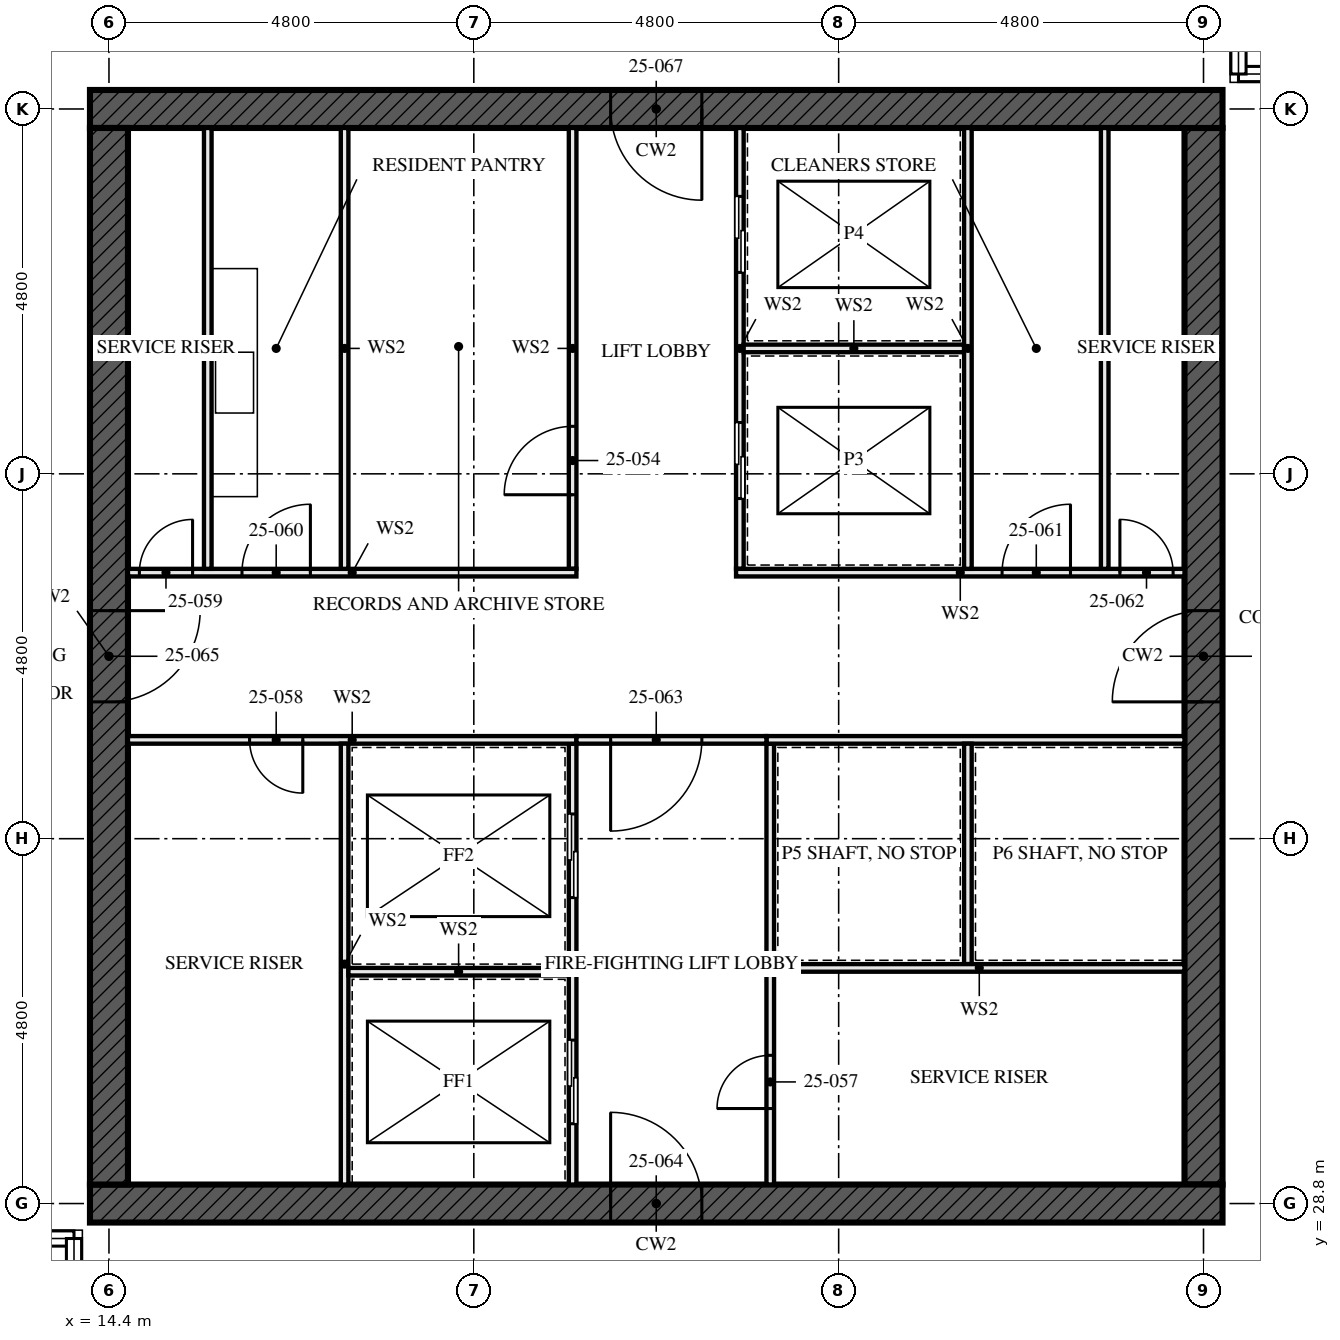
"""IFC4 building model, lengths in metres.
Left out: names, types, materials, properties, quantities, classifications, styles, units other than length and angle.
Written with IfcOpenShell. Run it as: python <this file> out.ifc"""

import sys

from ifc_helpers import new_model, si_unit, direction, frame, frame_2d, origin, place, context, subcontext, project, spatial, rectangle, extrude, element, fill, save


model = new_model("IFC4")
c1 = context("Model", 3, precision=1e-05, world=origin(), true_north=direction((0.0, 1.0)))
c2 = subcontext(c1, "Body", "Model", "MODEL_VIEW")
j1 = project(units=[si_unit("LENGTHUNIT", "METRE"), si_unit("PLANEANGLEUNIT", "RADIAN")], contexts=[c1])
p1 = place(None, origin())
s1 = spatial("IfcSite", under=j1, at=p1, CompositionType="ELEMENT")
p2 = place(p1, origin())
s2 = spatial("IfcBuilding", under=s1, at=p2, CompositionType="ELEMENT")
p3 = place(p2, frame((0.0, 0.0, 94.5)))
s3 = spatial("IfcBuildingStorey", under=s2, at=p3, CompositionType="ELEMENT", Elevation=94.5)
p4 = place(p3, frame((14.15, 28.8, -0.17), z_axis=(0.0, 0.0, 1.0), x_axis=(1.0, 0.0, 0.0)))
e1 = element("IfcWall", 1, at=p4, inside=s3, PredefinedType="SHEAR", context=c2, shape_type="SweptSolid", body=[
    extrude(rectangle(XDim=14.9, YDim=0.5, at=frame_2d((7.45, 0.0))), origin(), (0.0, 0.0, 1.0), 3.5),
])
p5 = place(p4, frame((6.85, 0.0, 0.17)))
e2 = element("IfcOpeningElement", 2, at=p5, cuts=e1, PredefinedType="OPENING", context=c2, shape_type="SweptSolid", body=[
    extrude(rectangle(XDim=1.2, YDim=2.1, at=frame_2d((0.6, 1.05))), frame((0.0, 0.26, 0.0), z_axis=(0.0, -1.0, 0.0), x_axis=(1.0, 0.0, 0.0)), (0.0, 0.0, 1.0), 0.521),
])
p6 = place(p3, frame((29.05, 43.2, -0.17), z_axis=(0.0, 0.0, 1.0), x_axis=(-1.0, 0.0, 0.0)))
e3 = element("IfcWall", 3, at=p6, inside=s3, PredefinedType="SHEAR", context=c2, shape_type="SweptSolid", body=[
    extrude(rectangle(XDim=14.9, YDim=0.5, at=frame_2d((7.45, 0.0))), origin(), (0.0, 0.0, 1.0), 3.5),
])
p7 = place(p6, frame((6.85, 0.0, 0.17)))
e4 = element("IfcOpeningElement", 4, at=p7, cuts=e3, PredefinedType="OPENING", context=c2, shape_type="SweptSolid", body=[
    extrude(rectangle(XDim=1.2, YDim=2.1, at=frame_2d((0.6, 1.05))), frame((0.0, 0.26, 0.0), z_axis=(0.0, -1.0, 0.0), x_axis=(1.0, 0.0, 0.0)), (0.0, 0.0, 1.0), 0.521),
])
p8 = place(p3, frame((14.4, 42.95, -0.17), z_axis=(0.0, 0.0, 1.0), x_axis=(0.0, -1.0, 0.0)))
e5 = element("IfcWall", 5, at=p8, inside=s3, PredefinedType="SHEAR", context=c2, shape_type="SweptSolid", body=[
    extrude(rectangle(XDim=13.9, YDim=0.5, at=frame_2d((6.95, 0.0))), origin(), (0.0, 0.0, 1.0), 3.5),
])
p9 = place(p8, frame((6.35, 0.0, 0.17)))
e6 = element("IfcOpeningElement", 6, at=p9, cuts=e5, PredefinedType="OPENING", context=c2, shape_type="SweptSolid", body=[
    extrude(rectangle(XDim=1.2, YDim=2.1, at=frame_2d((0.6, 1.05))), frame((0.0, 0.26, 0.0), z_axis=(0.0, -1.0, 0.0), x_axis=(1.0, 0.0, 0.0)), (0.0, 0.0, 1.0), 0.521),
])
p10 = place(p3, frame((28.8, 29.05, -0.17), z_axis=(0.0, 0.0, 1.0), x_axis=(0.0, 1.0, 0.0)))
e7 = element("IfcWall", 7, at=p10, inside=s3, PredefinedType="SHEAR", context=c2, shape_type="SweptSolid", body=[
    extrude(rectangle(XDim=13.9, YDim=0.5, at=frame_2d((6.95, 0.0))), origin(), (0.0, 0.0, 1.0), 3.5),
])
p11 = place(p10, frame((6.35, 0.0, 0.17)))
e8 = element("IfcOpeningElement", 8, at=p11, cuts=e7, PredefinedType="OPENING", context=c2, shape_type="SweptSolid", body=[
    extrude(rectangle(XDim=1.2, YDim=2.1, at=frame_2d((0.6, 1.05))), frame((0.0, 0.26, 0.0), z_axis=(0.0, -1.0, 0.0), x_axis=(1.0, 0.0, 0.0)), (0.0, 0.0, 1.0), 0.521),
])
for number, where, z_axis, x_axis in (
    (9, (15.7, 37.15, 0.0), (0.0, 0.0, 1.0), (0.0, 1.0, 0.0)),
    (10, (27.5, 37.15, 0.0), (0.0, 0.0, 1.0), (0.0, 1.0, 0.0)),
):
    element("IfcWall", number, at=place(p3, frame(where, z_axis=z_axis, x_axis=x_axis)), inside=s3, PredefinedType="SOLIDWALL", context=c2, shape_type="SweptSolid", body=[
        extrude(rectangle(XDim=5.8, YDim=0.1, at=frame_2d((2.9, 0.0))), origin(), (0.0, 0.0, 1.0), 3.33),
    ])
p12 = place(p3, frame((20.5, 29.05, 0.0), z_axis=(0.0, 0.0, 1.0), x_axis=(0.0, 1.0, 0.0)))
e11 = element("IfcWall", 11, at=p12, inside=s3, PredefinedType="SOLIDWALL", context=c2, shape_type="SweptSolid", body=[
    extrude(rectangle(XDim=5.8, YDim=0.1, at=frame_2d((2.9, 0.0))), origin(), (0.0, 0.0, 1.0), 3.33),
])
p13 = place(p12, frame((0.8, 0.0, 0.0)))
e12 = element("IfcOpeningElement", 12, at=p13, cuts=e11, PredefinedType="OPENING", context=c2, shape_type="SweptSolid", body=[
    extrude(rectangle(XDim=1.1, YDim=2.3, at=frame_2d((0.55, 1.15))), frame((0.0, 0.061, 0.0), z_axis=(0.0, -1.0, 0.0), x_axis=(1.0, 0.0, 0.0)), (0.0, 0.0, 1.0), 0.121),
])
p14 = place(p12, frame((3.775, 0.0, 0.0)))
e13 = element("IfcOpeningElement", 13, at=p14, cuts=e11, PredefinedType="OPENING", context=c2, shape_type="SweptSolid", body=[
    extrude(rectangle(XDim=1.1, YDim=2.3, at=frame_2d((0.55, 1.15))), frame((0.0, 0.061, 0.0), z_axis=(0.0, -1.0, 0.0), x_axis=(1.0, 0.0, 0.0)), (0.0, 0.0, 1.0), 0.121),
])
p15 = place(p3, frame((20.5, 37.15, 0.0), z_axis=(0.0, 0.0, 1.0), x_axis=(0.0, 1.0, 0.0)))
e14 = element("IfcWall", 14, at=p15, inside=s3, PredefinedType="SOLIDWALL", context=c2, shape_type="SweptSolid", body=[
    extrude(rectangle(XDim=5.8, YDim=0.1, at=frame_2d((2.9, 0.0))), origin(), (0.0, 0.0, 1.0), 3.33),
])
p16 = place(p15, frame((0.975, 0.0, 0.0)))
e15 = element("IfcOpeningElement", 15, at=p16, cuts=e14, PredefinedType="OPENING", context=c2, shape_type="SweptSolid", body=[
    extrude(rectangle(XDim=0.9, YDim=2.1, at=frame_2d((0.45, 1.05))), frame((0.0, 0.061, 0.0), z_axis=(0.0, -1.0, 0.0), x_axis=(1.0, 0.0, 0.0)), (0.0, 0.0, 1.0), 0.121),
])
p17 = place(p3, frame((22.7, 37.15, 0.0), z_axis=(0.0, 0.0, 1.0), x_axis=(0.0, 1.0, 0.0)))
e16 = element("IfcWall", 16, at=p17, inside=s3, PredefinedType="SOLIDWALL", context=c2, shape_type="SweptSolid", body=[
    extrude(rectangle(XDim=5.8, YDim=0.1, at=frame_2d((2.9, 0.0))), origin(), (0.0, 0.0, 1.0), 3.33),
])
p18 = place(p17, frame((0.925, 0.0, 0.0)))
e17 = element("IfcOpeningElement", 17, at=p18, cuts=e16, PredefinedType="OPENING", context=c2, shape_type="SweptSolid", body=[
    extrude(rectangle(XDim=1.0, YDim=2.1, at=frame_2d((0.5, 1.05))), frame((0.0, 0.061, 0.0), z_axis=(0.0, -1.0, 0.0), x_axis=(1.0, 0.0, 0.0)), (0.0, 0.0, 1.0), 0.121),
])
p19 = place(p17, frame((3.9, 0.0, 0.0)))
e18 = element("IfcOpeningElement", 18, at=p19, cuts=e16, PredefinedType="OPENING", context=c2, shape_type="SweptSolid", body=[
    extrude(rectangle(XDim=1.0, YDim=2.1, at=frame_2d((0.5, 1.05))), frame((0.0, 0.061, 0.0), z_axis=(0.0, -1.0, 0.0), x_axis=(1.0, 0.0, 0.0)), (0.0, 0.0, 1.0), 0.121),
])
p20 = place(p3, frame((23.1, 29.05, 0.0), z_axis=(0.0, 0.0, 1.0), x_axis=(0.0, 1.0, 0.0)))
e19 = element("IfcWall", 19, at=p20, inside=s3, PredefinedType="SOLIDWALL", context=c2, shape_type="SweptSolid", body=[
    extrude(rectangle(XDim=5.8, YDim=0.1, at=frame_2d((2.9, 0.0))), origin(), (0.0, 0.0, 1.0), 3.33),
])
p21 = place(p20, frame((1.0, 0.0, 0.0)))
e20 = element("IfcOpeningElement", 20, at=p21, cuts=e19, PredefinedType="OPENING", context=c2, shape_type="SweptSolid", body=[
    extrude(rectangle(XDim=0.7, YDim=2.1, at=frame_2d((0.35, 1.05))), frame((0.0, 0.061, 0.0), z_axis=(0.0, -1.0, 0.0), x_axis=(1.0, 0.0, 0.0)), (0.0, 0.0, 1.0), 0.121),
])
p22 = place(p3, frame((14.65, 34.9, 0.0), z_axis=(0.0, 0.0, 1.0), x_axis=(1.0, 0.0, 0.0)))
e21 = element("IfcWall", 21, at=p22, inside=s3, PredefinedType="SOLIDWALL", context=c2, shape_type="SweptSolid", body=[
    extrude(rectangle(XDim=5.9, YDim=0.1, at=frame_2d((2.95, 0.0))), origin(), (0.0, 0.0, 1.0), 3.33),
])
p23 = place(p22, frame((1.6, 0.0, 0.0)))
e22 = element("IfcOpeningElement", 22, at=p23, cuts=e21, PredefinedType="OPENING", context=c2, shape_type="SweptSolid", body=[
    extrude(rectangle(XDim=0.7, YDim=2.1, at=frame_2d((0.35, 1.05))), frame((0.0, 0.061, 0.0), z_axis=(0.0, -1.0, 0.0), x_axis=(1.0, 0.0, 0.0)), (0.0, 0.0, 1.0), 0.121),
])
p24 = place(p3, frame((23.05, 34.9, 0.0), z_axis=(0.0, 0.0, 1.0), x_axis=(1.0, 0.0, 0.0)))
e23 = element("IfcWall", 23, at=p24, inside=s3, PredefinedType="SOLIDWALL", context=c2, shape_type="SweptSolid", body=[
    extrude(rectangle(XDim=5.5, YDim=0.1, at=frame_2d((2.75, 0.0))), origin(), (0.0, 0.0, 1.0), 3.33),
])
p25 = place(p3, frame((14.65, 37.1, 0.0), z_axis=(0.0, 0.0, 1.0), x_axis=(1.0, 0.0, 0.0)))
e24 = element("IfcWall", 24, at=p25, inside=s3, PredefinedType="SOLIDWALL", context=c2, shape_type="SweptSolid", body=[
    extrude(rectangle(XDim=5.9, YDim=0.1, at=frame_2d((2.95, 0.0))), origin(), (0.0, 0.0, 1.0), 3.33),
])
p26 = place(p25, frame((0.15, 0.0, 0.0)))
e25 = element("IfcOpeningElement", 25, at=p26, cuts=e24, PredefinedType="OPENING", context=c2, shape_type="SweptSolid", body=[
    extrude(rectangle(XDim=0.7, YDim=2.1, at=frame_2d((0.35, 1.05))), frame((0.0, 0.061, 0.0), z_axis=(0.0, -1.0, 0.0), x_axis=(1.0, 0.0, 0.0)), (0.0, 0.0, 1.0), 0.121),
])
p27 = place(p25, frame((1.5, 0.0, 0.0)))
e26 = element("IfcOpeningElement", 26, at=p27, cuts=e24, PredefinedType="OPENING", context=c2, shape_type="SweptSolid", body=[
    extrude(rectangle(XDim=0.9, YDim=2.1, at=frame_2d((0.45, 1.05))), frame((0.0, 0.061, 0.0), z_axis=(0.0, -1.0, 0.0), x_axis=(1.0, 0.0, 0.0)), (0.0, 0.0, 1.0), 0.121),
])
p28 = place(p3, frame((22.65, 37.1, 0.0), z_axis=(0.0, 0.0, 1.0), x_axis=(1.0, 0.0, 0.0)))
e27 = element("IfcWall", 27, at=p28, inside=s3, PredefinedType="SOLIDWALL", context=c2, shape_type="SweptSolid", body=[
    extrude(rectangle(XDim=5.9, YDim=0.1, at=frame_2d((2.95, 0.0))), origin(), (0.0, 0.0, 1.0), 3.33),
])
p29 = place(p28, frame((3.5, 0.0, 0.0)))
e28 = element("IfcOpeningElement", 28, at=p29, cuts=e27, PredefinedType="OPENING", context=c2, shape_type="SweptSolid", body=[
    extrude(rectangle(XDim=0.9, YDim=2.1, at=frame_2d((0.45, 1.05))), frame((0.0, 0.061, 0.0), z_axis=(0.0, -1.0, 0.0), x_axis=(1.0, 0.0, 0.0)), (0.0, 0.0, 1.0), 0.121),
])
p30 = place(p28, frame((5.05, 0.0, 0.0)))
e29 = element("IfcOpeningElement", 29, at=p30, cuts=e27, PredefinedType="OPENING", context=c2, shape_type="SweptSolid", body=[
    extrude(rectangle(XDim=0.7, YDim=2.1, at=frame_2d((0.35, 1.05))), frame((0.0, 0.061, 0.0), z_axis=(0.0, -1.0, 0.0), x_axis=(1.0, 0.0, 0.0)), (0.0, 0.0, 1.0), 0.121),
])
p31 = place(p3, frame((20.55, 34.9, 0.0), z_axis=(0.0, 0.0, 1.0), x_axis=(1.0, 0.0, 0.0)))
e30 = element("IfcWall", 30, at=p31, inside=s3, PredefinedType="SOLIDWALL", context=c2, shape_type="SweptSolid", body=[
    extrude(rectangle(XDim=2.5, YDim=0.1, at=frame_2d((1.25, 0.0))), origin(), (0.0, 0.0, 1.0), 3.33),
])
p32 = place(p31, frame((0.45, 0.0, 0.0)))
e31 = element("IfcOpeningElement", 31, at=p32, cuts=e30, PredefinedType="OPENING", context=c2, shape_type="SweptSolid", body=[
    extrude(rectangle(XDim=1.2, YDim=2.1, at=frame_2d((0.6, 1.05))), frame((0.0, 0.061, 0.0), z_axis=(0.0, -1.0, 0.0), x_axis=(1.0, 0.0, 0.0)), (0.0, 0.0, 1.0), 0.121),
])
p33 = place(p3, frame((17.5, 29.05, 0.0), z_axis=(0.0, 0.0, 1.0), x_axis=(0.0, 1.0, 0.0)))
e32 = element("IfcWall", 32, at=p33, inside=s3, PredefinedType="SOLIDWALL", context=c2, shape_type="SweptSolid", body=[
    extrude(rectangle(XDim=5.8, YDim=0.1, at=frame_2d((2.9, 0.0))), origin(), (0.0, 0.0, 1.0), 3.33),
])
p34 = place(p3, frame((17.55, 31.85, 0.0), z_axis=(0.0, 0.0, 1.0), x_axis=(1.0, 0.0, 0.0)))
e33 = element("IfcWall", 33, at=p34, inside=s3, PredefinedType="SOLIDWALL", context=c2, shape_type="SweptSolid", body=[
    extrude(rectangle(XDim=2.9, YDim=0.1, at=frame_2d((1.45, 0.0))), origin(), (0.0, 0.0, 1.0), 3.33),
])
p35 = place(p3, frame((17.5, 37.15, 0.0), z_axis=(0.0, 0.0, 1.0), x_axis=(0.0, 1.0, 0.0)))
e34 = element("IfcWall", 34, at=p35, inside=s3, PredefinedType="SOLIDWALL", context=c2, shape_type="SweptSolid", body=[
    extrude(rectangle(XDim=5.8, YDim=0.1, at=frame_2d((2.9, 0.0))), origin(), (0.0, 0.0, 1.0), 3.33),
])
p36 = place(p3, frame((22.75, 40.05, 0.0), z_axis=(0.0, 0.0, 1.0), x_axis=(1.0, 0.0, 0.0)))
e35 = element("IfcWall", 35, at=p36, inside=s3, PredefinedType="SOLIDWALL", context=c2, shape_type="SweptSolid", body=[
    extrude(rectangle(XDim=2.9, YDim=0.1, at=frame_2d((1.45, 0.0))), origin(), (0.0, 0.0, 1.0), 3.33),
])
p37 = place(p3, frame((25.7, 37.15, 0.0), z_axis=(0.0, 0.0, 1.0), x_axis=(0.0, 1.0, 0.0)))
e36 = element("IfcWall", 36, at=p37, inside=s3, PredefinedType="SOLIDWALL", context=c2, shape_type="SweptSolid", body=[
    extrude(rectangle(XDim=5.8, YDim=0.1, at=frame_2d((2.9, 0.0))), origin(), (0.0, 0.0, 1.0), 3.33),
])
p38 = place(p3, frame((25.7, 31.95, 0.0), z_axis=(0.0, 0.0, 1.0), x_axis=(0.0, 1.0, 0.0)))
e37 = element("IfcWall", 37, at=p38, inside=s3, PredefinedType="SOLIDWALL", context=c2, shape_type="SweptSolid", body=[
    extrude(rectangle(XDim=2.9, YDim=0.1, at=frame_2d((1.45, 0.0))), origin(), (0.0, 0.0, 1.0), 3.33),
])
p39 = place(p3, frame((23.15, 31.9, 0.0), z_axis=(0.0, 0.0, 1.0), x_axis=(1.0, 0.0, 0.0)))
e38 = element("IfcWall", 38, at=p39, inside=s3, PredefinedType="SOLIDWALL", context=c2, shape_type="SweptSolid", body=[
    extrude(rectangle(XDim=5.4, YDim=0.1, at=frame_2d((2.7, 0.0))), origin(), (0.0, 0.0, 1.0), 3.33),
])
p40 = place(p13, origin())
e39 = element("IfcDoor", 39, at=p40, inside=s3, OperationType="SLIDING_TO_LEFT", PredefinedType="DOOR", context=c2, shape_type="SweptSolid", body=[
    extrude(rectangle(XDim=1.1, YDim=2.3, at=frame_2d((0.55, 1.15))), frame((0.0, 0.05, 0.0), z_axis=(0.0, -1.0, 0.0), x_axis=(1.0, 0.0, 0.0)), (0.0, 0.0, 1.0), 0.1),
])
fill(e12, e39)
p41 = place(p14, origin())
e40 = element("IfcDoor", 40, at=p41, inside=s3, OperationType="SLIDING_TO_LEFT", PredefinedType="DOOR", context=c2, shape_type="SweptSolid", body=[
    extrude(rectangle(XDim=1.1, YDim=2.3, at=frame_2d((0.55, 1.15))), frame((0.0, 0.05, 0.0), z_axis=(0.0, -1.0, 0.0), x_axis=(1.0, 0.0, 0.0)), (0.0, 0.0, 1.0), 0.1),
])
fill(e13, e40)
p42 = place(p16, origin())
e41 = element("IfcDoor", 41, at=p42, inside=s3, OperationType="SINGLE_SWING_RIGHT", PredefinedType="DOOR", context=c2, shape_type="SweptSolid", body=[
    extrude(rectangle(XDim=0.9, YDim=2.1, at=frame_2d((0.45, 1.05))), frame((0.0, 0.027, 0.0), z_axis=(0.0, -1.0, 0.0), x_axis=(1.0, 0.0, 0.0)), (0.0, 0.0, 1.0), 0.054),
])
fill(e15, e41)
p43 = place(p18, origin())
e42 = element("IfcDoor", 42, at=p43, inside=s3, OperationType="SLIDING_TO_LEFT", PredefinedType="DOOR", context=c2, shape_type="SweptSolid", body=[
    extrude(rectangle(XDim=1.0, YDim=2.1, at=frame_2d((0.5, 1.05))), frame((0.0, 0.05, 0.0), z_axis=(0.0, -1.0, 0.0), x_axis=(1.0, 0.0, 0.0)), (0.0, 0.0, 1.0), 0.1),
])
fill(e17, e42)
p44 = place(p19, origin())
e43 = element("IfcDoor", 43, at=p44, inside=s3, OperationType="SLIDING_TO_LEFT", PredefinedType="DOOR", context=c2, shape_type="SweptSolid", body=[
    extrude(rectangle(XDim=1.0, YDim=2.1, at=frame_2d((0.5, 1.05))), frame((0.0, 0.05, 0.0), z_axis=(0.0, -1.0, 0.0), x_axis=(1.0, 0.0, 0.0)), (0.0, 0.0, 1.0), 0.1),
])
fill(e18, e43)
p45 = place(p21, origin())
e44 = element("IfcDoor", 44, at=p45, inside=s3, OperationType="SINGLE_SWING_RIGHT", PredefinedType="DOOR", context=c2, shape_type="SweptSolid", body=[
    extrude(rectangle(XDim=0.7, YDim=2.1, at=frame_2d((0.35, 1.05))), frame((0.0, 0.027, 0.0), z_axis=(0.0, -1.0, 0.0), x_axis=(1.0, 0.0, 0.0)), (0.0, 0.0, 1.0), 0.054),
])
fill(e20, e44)
p46 = place(p23, frame((0.7, 0.0, 0.0), z_axis=(0.0, 0.0, 1.0), x_axis=(-1.0, 0.0, 0.0)))
e45 = element("IfcDoor", 45, at=p46, inside=s3, OperationType="SINGLE_SWING_RIGHT", PredefinedType="DOOR", context=c2, shape_type="SweptSolid", body=[
    extrude(rectangle(XDim=0.7, YDim=2.1, at=frame_2d((0.35, 1.05))), frame((0.0, 0.027, 0.0), z_axis=(0.0, -1.0, 0.0), x_axis=(1.0, 0.0, 0.0)), (0.0, 0.0, 1.0), 0.054),
])
fill(e22, e45)
p47 = place(p26, origin())
e46 = element("IfcDoor", 46, at=p47, inside=s3, OperationType="SINGLE_SWING_LEFT", PredefinedType="DOOR", context=c2, shape_type="SweptSolid", body=[
    extrude(rectangle(XDim=0.7, YDim=2.1, at=frame_2d((0.35, 1.05))), frame((0.0, 0.027, 0.0), z_axis=(0.0, -1.0, 0.0), x_axis=(1.0, 0.0, 0.0)), (0.0, 0.0, 1.0), 0.054),
])
fill(e25, e46)
p48 = place(p27, origin())
e47 = element("IfcDoor", 47, at=p48, inside=s3, OperationType="SINGLE_SWING_LEFT", PredefinedType="DOOR", context=c2, shape_type="SweptSolid", body=[
    extrude(rectangle(XDim=0.9, YDim=2.1, at=frame_2d((0.45, 1.05))), frame((0.0, 0.027, 0.0), z_axis=(0.0, -1.0, 0.0), x_axis=(1.0, 0.0, 0.0)), (0.0, 0.0, 1.0), 0.054),
])
fill(e26, e47)
p49 = place(p29, origin())
e48 = element("IfcDoor", 48, at=p49, inside=s3, OperationType="SINGLE_SWING_LEFT", PredefinedType="DOOR", context=c2, shape_type="SweptSolid", body=[
    extrude(rectangle(XDim=0.9, YDim=2.1, at=frame_2d((0.45, 1.05))), frame((0.0, 0.027, 0.0), z_axis=(0.0, -1.0, 0.0), x_axis=(1.0, 0.0, 0.0)), (0.0, 0.0, 1.0), 0.054),
])
fill(e28, e48)
p50 = place(p30, origin())
e49 = element("IfcDoor", 49, at=p50, inside=s3, OperationType="SINGLE_SWING_RIGHT", PredefinedType="DOOR", context=c2, shape_type="SweptSolid", body=[
    extrude(rectangle(XDim=0.7, YDim=2.1, at=frame_2d((0.35, 1.05))), frame((0.0, 0.027, 0.0), z_axis=(0.0, -1.0, 0.0), x_axis=(1.0, 0.0, 0.0)), (0.0, 0.0, 1.0), 0.054),
])
fill(e29, e49)
p51 = place(p32, frame((1.2, 0.0, 0.0), z_axis=(0.0, 0.0, 1.0), x_axis=(-1.0, 0.0, 0.0)))
e50 = element("IfcDoor", 50, at=p51, inside=s3, OperationType="SINGLE_SWING_LEFT", PredefinedType="DOOR", context=c2, shape_type="SweptSolid", body=[
    extrude(rectangle(XDim=1.2, YDim=2.1, at=frame_2d((0.6, 1.05))), frame((0.0, 0.027, 0.0), z_axis=(0.0, -1.0, 0.0), x_axis=(1.0, 0.0, 0.0)), (0.0, 0.0, 1.0), 0.054),
])
fill(e31, e50)
p52 = place(p5, origin())
e51 = element("IfcDoor", 51, at=p52, inside=s3, OperationType="SINGLE_SWING_LEFT", PredefinedType="DOOR", context=c2, shape_type="SweptSolid", body=[
    extrude(rectangle(XDim=1.2, YDim=2.1, at=frame_2d((0.6, 1.05))), frame((0.0, 0.027, 0.0), z_axis=(0.0, -1.0, 0.0), x_axis=(1.0, 0.0, 0.0)), (0.0, 0.0, 1.0), 0.054),
])
fill(e2, e51)
p53 = place(p9, origin())
e52 = element("IfcDoor", 52, at=p53, inside=s3, OperationType="SINGLE_SWING_LEFT", PredefinedType="DOOR", context=c2, shape_type="SweptSolid", body=[
    extrude(rectangle(XDim=1.2, YDim=2.1, at=frame_2d((0.6, 1.05))), frame((0.0, 0.027, 0.0), z_axis=(0.0, -1.0, 0.0), x_axis=(1.0, 0.0, 0.0)), (0.0, 0.0, 1.0), 0.054),
])
fill(e6, e52)
p54 = place(p11, origin())
e53 = element("IfcDoor", 53, at=p54, inside=s3, OperationType="SINGLE_SWING_LEFT", PredefinedType="DOOR", context=c2, shape_type="SweptSolid", body=[
    extrude(rectangle(XDim=1.2, YDim=2.1, at=frame_2d((0.6, 1.05))), frame((0.0, 0.027, 0.0), z_axis=(0.0, -1.0, 0.0), x_axis=(1.0, 0.0, 0.0)), (0.0, 0.0, 1.0), 0.054),
])
fill(e8, e53)
p55 = place(p7, origin())
e54 = element("IfcDoor", 54, at=p55, inside=s3, OperationType="SINGLE_SWING_LEFT", PredefinedType="DOOR", context=c2, shape_type="SweptSolid", body=[
    extrude(rectangle(XDim=1.2, YDim=2.1, at=frame_2d((0.6, 1.05))), frame((0.0, 0.027, 0.0), z_axis=(0.0, -1.0, 0.0), x_axis=(1.0, 0.0, 0.0)), (0.0, 0.0, 1.0), 0.054),
])
fill(e4, e54)
save(model, sys.argv[1])
